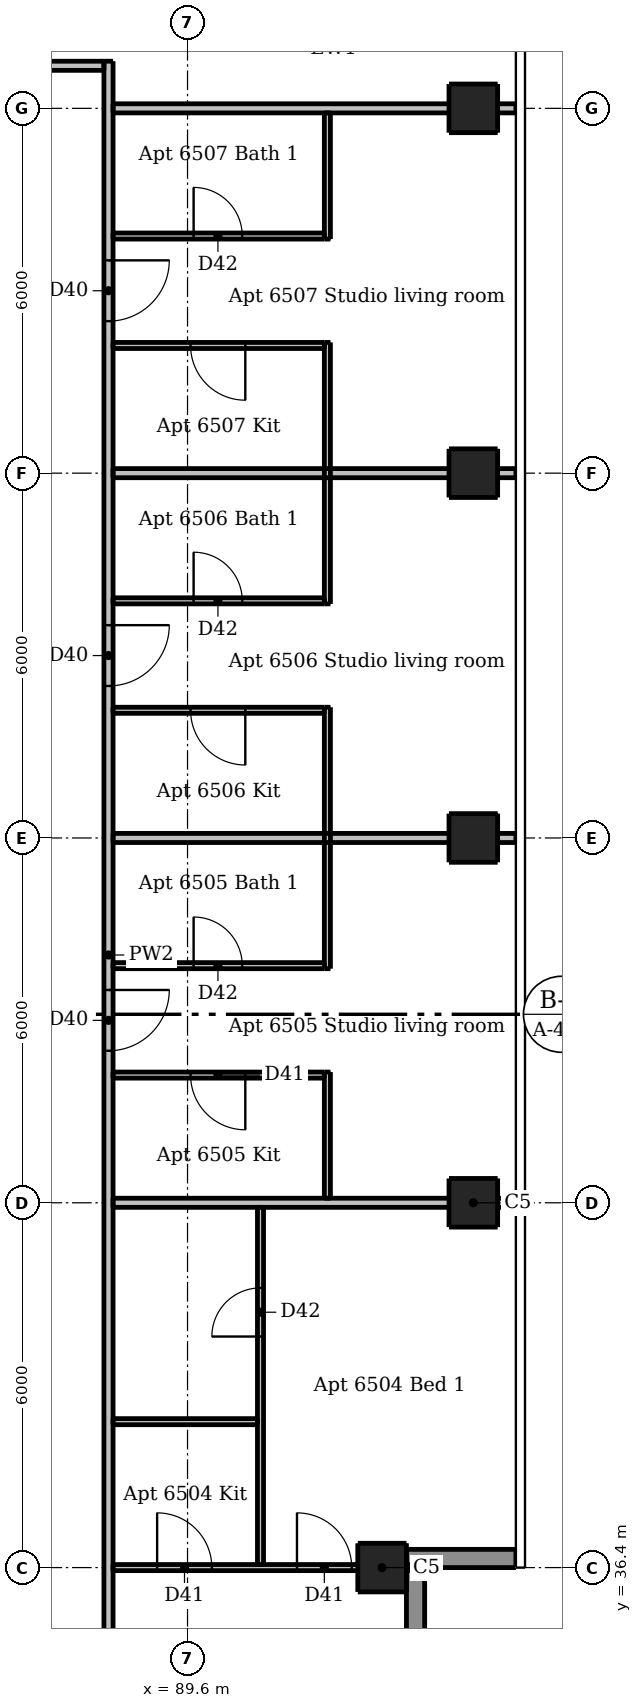
"""IFC4 building model, lengths in metres.
Left out: names, types, materials, properties, quantities, classifications, styles, units other than length and angle.
Written with IfcOpenShell. Run it as: python <this file> out.ifc"""

import sys

from ifc_helpers import new_model, si_unit, direction, frame, frame_2d, origin, origin_2d, place, context, subcontext, project, spatial, rectangle, extrude, element, fill, save


model = new_model("IFC4")
c1 = context("Model", 3, precision=1e-05, world=origin(), true_north=direction((0.0, 1.0)))
c2 = subcontext(c1, "Body", "Model", "MODEL_VIEW")
j1 = project(units=[si_unit("LENGTHUNIT", "METRE"), si_unit("PLANEANGLEUNIT", "RADIAN")], contexts=[c1])
p1 = place(None, origin())
s1 = spatial("IfcSite", under=j1, at=p1, CompositionType="ELEMENT")
p2 = place(p1, origin())
s2 = spatial("IfcBuilding", under=s1, at=p2, CompositionType="ELEMENT")
p3 = place(p2, frame((0.0, 0.0, 245.5)))
s3 = spatial("IfcBuildingStorey", under=s2, at=p3, CompositionType="ELEMENT", Elevation=245.5)
for number, where, z_axis, x_axis in (
    (1, (92.8, 36.4, 0.0), (0.0, 0.0, 1.0), (1.0, 0.0, 0.0)),
    (2, (94.3, 42.4, 0.0), (0.0, 0.0, 1.0), (1.0, 0.0, 0.0)),
    (3, (94.3, 48.4, 0.0), (0.0, 0.0, 1.0), (1.0, 0.0, 0.0)),
    (4, (94.3, 54.4, 0.0), (0.0, 0.0, 1.0), (1.0, 0.0, 0.0)),
    (5, (94.3, 60.4, 0.0), (0.0, 0.0, 1.0), (1.0, 0.0, 0.0)),
):
    element("IfcColumn", number, at=place(p3, frame(where, z_axis=z_axis, x_axis=x_axis)), inside=s3, PredefinedType="COLUMN", context=c2, shape_type="SweptSolid", body=[
        extrude(rectangle(XDim=0.8, YDim=0.8, at=origin_2d()), origin(), (0.0, 0.0, 1.0), 3.05),
    ])
p4 = place(p3, frame((93.2, 36.55, 0.0), z_axis=(0.0, 0.0, 1.0), x_axis=(1.0, 0.0, 0.0)))
e6 = element("IfcWall", 6, at=p4, inside=s3, PredefinedType="SOLIDWALL", context=c2, shape_type="SweptSolid", body=[
    extrude(rectangle(XDim=1.8, YDim=0.3, at=frame_2d((0.9, 0.0))), origin(), (0.0, 0.0, 1.0), 3.05),
])
p5 = place(p3, frame((93.35, 31.3, 0.0), z_axis=(0.0, 0.0, 1.0), x_axis=(0.0, 1.0, 0.0)))
e7 = element("IfcWall", 7, at=p5, inside=s3, PredefinedType="SOLIDWALL", context=c2, shape_type="SweptSolid", body=[
    extrude(rectangle(XDim=5.1, YDim=0.3, at=frame_2d((2.55, 0.0))), origin(), (0.0, 0.0, 1.0), 3.05),
])
p6 = place(p5, frame((1.2, 0.0, 0.15)))
e8 = element("IfcOpeningElement", 8, at=p6, cuts=e7, PredefinedType="OPENING", context=c2, shape_type="SweptSolid", body=[
    extrude(rectangle(XDim=2.7, YDim=2.1, at=frame_2d((1.35, 1.05))), frame((0.0, 0.16, 0.0), z_axis=(0.0, -1.0, 0.0), x_axis=(1.0, 0.0, 0.0)), (0.0, 0.0, 1.0), 0.32),
])
p7 = place(p3, frame((90.8, 36.45, 0.0), z_axis=(0.0, 0.0, 1.0), x_axis=(0.0, 1.0, 0.0)))
e9 = element("IfcWall", 9, at=p7, inside=s3, PredefinedType="PARTITIONING", context=c2, shape_type="SweptSolid", body=[
    extrude(rectangle(XDim=5.875, YDim=0.1, at=frame_2d((2.938, 0.0))), origin(), (0.0, 0.0, 1.0), 3.05),
])
p8 = place(p7, frame((3.75, 0.0, 0.0)))
e10 = element("IfcOpeningElement", 10, at=p8, cuts=e9, PredefinedType="OPENING", context=c2, shape_type="SweptSolid", body=[
    extrude(rectangle(XDim=0.8, YDim=2.1, at=frame_2d((0.4, 1.05))), frame((0.0, 0.06, 0.0), z_axis=(0.0, -1.0, 0.0), x_axis=(1.0, 0.0, 0.0)), (0.0, 0.0, 1.0), 0.12),
])
p9 = place(p3, frame((91.9, 42.475, 0.0), z_axis=(0.0, 0.0, 1.0), x_axis=(0.0, 1.0, 0.0)))
e11 = element("IfcWall", 11, at=p9, inside=s3, PredefinedType="PARTITIONING", context=c2, shape_type="SweptSolid", body=[
    extrude(rectangle(XDim=2.075, YDim=0.1, at=frame_2d((1.038, 0.0))), origin(), (0.0, 0.0, 1.0), 3.05),
])
for number, where, z_axis, x_axis in (
    (12, (91.9, 46.25, 0.0), (0.0, 0.0, 1.0), (0.0, 1.0, 0.0)),
    (13, (91.9, 52.25, 0.0), (0.0, 0.0, 1.0), (0.0, 1.0, 0.0)),
):
    element("IfcWall", number, at=place(p3, frame(where, z_axis=z_axis, x_axis=x_axis)), inside=s3, PredefinedType="PARTITIONING", context=c2, shape_type="SweptSolid", body=[
        extrude(rectangle(XDim=4.3, YDim=0.1, at=frame_2d((2.15, 0.0))), origin(), (0.0, 0.0, 1.0), 3.05),
    ])
p10 = place(p3, frame((91.9, 58.25, 0.0), z_axis=(0.0, 0.0, 1.0), x_axis=(0.0, 1.0, 0.0)))
e14 = element("IfcWall", 14, at=p10, inside=s3, PredefinedType="PARTITIONING", context=c2, shape_type="SweptSolid", body=[
    extrude(rectangle(XDim=2.075, YDim=0.1, at=frame_2d((1.038, 0.0))), origin(), (0.0, 0.0, 1.0), 3.05),
])
p11 = place(p3, frame((88.375, 58.3, 0.0), z_axis=(0.0, 0.0, 1.0), x_axis=(1.0, 0.0, 0.0)))
e15 = element("IfcWall", 15, at=p11, inside=s3, PredefinedType="PARTITIONING", context=c2, shape_type="SweptSolid", body=[
    extrude(rectangle(XDim=3.475, YDim=0.1, at=frame_2d((1.738, 0.0))), origin(), (0.0, 0.0, 1.0), 3.05),
])
p12 = place(p11, frame((1.325, 0.0, 0.0)))
e16 = element("IfcOpeningElement", 16, at=p12, cuts=e15, PredefinedType="OPENING", context=c2, shape_type="SweptSolid", body=[
    extrude(rectangle(XDim=0.8, YDim=2.1, at=frame_2d((0.4, 1.05))), frame((0.0, 0.06, 0.0), z_axis=(0.0, -1.0, 0.0), x_axis=(1.0, 0.0, 0.0)), (0.0, 0.0, 1.0), 0.12),
])
p13 = place(p3, frame((91.85, 56.5, 0.0), z_axis=(0.0, 0.0, 1.0), x_axis=(-1.0, 0.0, 0.0)))
e17 = element("IfcWall", 17, at=p13, inside=s3, PredefinedType="PARTITIONING", context=c2, shape_type="SweptSolid", body=[
    extrude(rectangle(XDim=3.475, YDim=0.1, at=frame_2d((1.738, 0.0))), origin(), (0.0, 0.0, 1.0), 3.05),
])
p14 = place(p13, frame((1.3, 0.0, 0.0)))
e18 = element("IfcOpeningElement", 18, at=p14, cuts=e17, PredefinedType="OPENING", context=c2, shape_type="SweptSolid", body=[
    extrude(rectangle(XDim=0.9, YDim=2.1, at=frame_2d((0.45, 1.05))), frame((0.0, 0.06, 0.0), z_axis=(0.0, -1.0, 0.0), x_axis=(1.0, 0.0, 0.0)), (0.0, 0.0, 1.0), 0.12),
])
p15 = place(p3, frame((88.375, 52.3, 0.0), z_axis=(0.0, 0.0, 1.0), x_axis=(1.0, 0.0, 0.0)))
e19 = element("IfcWall", 19, at=p15, inside=s3, PredefinedType="PARTITIONING", context=c2, shape_type="SweptSolid", body=[
    extrude(rectangle(XDim=3.475, YDim=0.1, at=frame_2d((1.738, 0.0))), origin(), (0.0, 0.0, 1.0), 3.05),
])
p16 = place(p15, frame((1.325, 0.0, 0.0)))
e20 = element("IfcOpeningElement", 20, at=p16, cuts=e19, PredefinedType="OPENING", context=c2, shape_type="SweptSolid", body=[
    extrude(rectangle(XDim=0.8, YDim=2.1, at=frame_2d((0.4, 1.05))), frame((0.0, 0.06, 0.0), z_axis=(0.0, -1.0, 0.0), x_axis=(1.0, 0.0, 0.0)), (0.0, 0.0, 1.0), 0.12),
])
p17 = place(p3, frame((91.85, 50.5, 0.0), z_axis=(0.0, 0.0, 1.0), x_axis=(-1.0, 0.0, 0.0)))
e21 = element("IfcWall", 21, at=p17, inside=s3, PredefinedType="PARTITIONING", context=c2, shape_type="SweptSolid", body=[
    extrude(rectangle(XDim=3.475, YDim=0.1, at=frame_2d((1.738, 0.0))), origin(), (0.0, 0.0, 1.0), 3.05),
])
p18 = place(p17, frame((1.3, 0.0, 0.0)))
e22 = element("IfcOpeningElement", 22, at=p18, cuts=e21, PredefinedType="OPENING", context=c2, shape_type="SweptSolid", body=[
    extrude(rectangle(XDim=0.9, YDim=2.1, at=frame_2d((0.45, 1.05))), frame((0.0, 0.06, 0.0), z_axis=(0.0, -1.0, 0.0), x_axis=(1.0, 0.0, 0.0)), (0.0, 0.0, 1.0), 0.12),
])
p19 = place(p3, frame((88.375, 46.3, 0.0), z_axis=(0.0, 0.0, 1.0), x_axis=(1.0, 0.0, 0.0)))
e23 = element("IfcWall", 23, at=p19, inside=s3, PredefinedType="PARTITIONING", context=c2, shape_type="SweptSolid", body=[
    extrude(rectangle(XDim=3.475, YDim=0.1, at=frame_2d((1.738, 0.0))), origin(), (0.0, 0.0, 1.0), 3.05),
])
p20 = place(p19, frame((1.325, 0.0, 0.0)))
e24 = element("IfcOpeningElement", 24, at=p20, cuts=e23, PredefinedType="OPENING", context=c2, shape_type="SweptSolid", body=[
    extrude(rectangle(XDim=0.8, YDim=2.1, at=frame_2d((0.4, 1.05))), frame((0.0, 0.06, 0.0), z_axis=(0.0, -1.0, 0.0), x_axis=(1.0, 0.0, 0.0)), (0.0, 0.0, 1.0), 0.12),
])
p21 = place(p3, frame((91.85, 44.5, 0.0), z_axis=(0.0, 0.0, 1.0), x_axis=(-1.0, 0.0, 0.0)))
e25 = element("IfcWall", 25, at=p21, inside=s3, PredefinedType="PARTITIONING", context=c2, shape_type="SweptSolid", body=[
    extrude(rectangle(XDim=3.475, YDim=0.1, at=frame_2d((1.738, 0.0))), origin(), (0.0, 0.0, 1.0), 3.05),
])
p22 = place(p21, frame((1.3, 0.0, 0.0)))
e26 = element("IfcOpeningElement", 26, at=p22, cuts=e25, PredefinedType="OPENING", context=c2, shape_type="SweptSolid", body=[
    extrude(rectangle(XDim=0.9, YDim=2.1, at=frame_2d((0.45, 1.05))), frame((0.0, 0.06, 0.0), z_axis=(0.0, -1.0, 0.0), x_axis=(1.0, 0.0, 0.0)), (0.0, 0.0, 1.0), 0.12),
])
p23 = place(p3, frame((88.375, 38.8, 0.0), z_axis=(0.0, 0.0, 1.0), x_axis=(1.0, 0.0, 0.0)))
e27 = element("IfcWall", 27, at=p23, inside=s3, PredefinedType="PARTITIONING", context=c2, shape_type="SweptSolid", body=[
    extrude(rectangle(XDim=2.375, YDim=0.1, at=frame_2d((1.188, 0.0))), origin(), (0.0, 0.0, 1.0), 3.05),
])
p24 = place(p3, frame((88.375, 36.4, 0.0), z_axis=(0.0, 0.0, 1.0), x_axis=(1.0, 0.0, 0.0)))
e28 = element("IfcWall", 28, at=p24, inside=s3, PredefinedType="PARTITIONING", context=c2, shape_type="SweptSolid", body=[
    extrude(rectangle(XDim=5.125, YDim=0.1, at=frame_2d((2.562, 0.0))), origin(), (0.0, 0.0, 1.0), 2.647),
])
p25 = place(p24, frame((0.725, 0.0, 0.0)))
e29 = element("IfcOpeningElement", 29, at=p25, cuts=e28, PredefinedType="OPENING", context=c2, shape_type="SweptSolid", body=[
    extrude(rectangle(XDim=0.9, YDim=2.1, at=frame_2d((0.45, 1.05))), frame((0.0, 0.06, 0.0), z_axis=(0.0, -1.0, 0.0), x_axis=(1.0, 0.0, 0.0)), (0.0, 0.0, 1.0), 0.12),
])
p26 = place(p24, frame((3.025, 0.0, 0.0)))
e30 = element("IfcOpeningElement", 30, at=p26, cuts=e28, PredefinedType="OPENING", context=c2, shape_type="SweptSolid", body=[
    extrude(rectangle(XDim=0.9, YDim=2.1, at=frame_2d((0.45, 1.05))), frame((0.0, 0.06, 0.0), z_axis=(0.0, -1.0, 0.0), x_axis=(1.0, 0.0, 0.0)), (0.0, 0.0, 1.0), 0.12),
])
p27 = place(p3, frame((88.3, 61.175, 0.0), z_axis=(0.0, 0.0, 1.0), x_axis=(0.0, -1.0, 0.0)))
e31 = element("IfcWall", 31, at=p27, inside=s3, PredefinedType="PARTITIONING", context=c2, shape_type="SweptSolid", body=[
    extrude(rectangle(XDim=29.4, YDim=0.15, at=frame_2d((14.7, 0.0))), origin(), (0.0, 0.0, 1.0), 3.05),
])
p28 = place(p27, frame((26.625, 0.0, 0.0)))
e32 = element("IfcOpeningElement", 32, at=p28, cuts=e31, PredefinedType="OPENING", context=c2, shape_type="SweptSolid", body=[
    extrude(rectangle(XDim=1.0, YDim=2.1, at=frame_2d((0.5, 1.05))), frame((0.0, 0.085, 0.0), z_axis=(0.0, -1.0, 0.0), x_axis=(1.0, 0.0, 0.0)), (0.0, 0.0, 1.0), 0.17),
])
p29 = place(p27, frame((15.275, 0.0, 0.0)))
e33 = element("IfcOpeningElement", 33, at=p29, cuts=e31, PredefinedType="OPENING", context=c2, shape_type="SweptSolid", body=[
    extrude(rectangle(XDim=1.0, YDim=2.1, at=frame_2d((0.5, 1.05))), frame((0.0, 0.085, 0.0), z_axis=(0.0, -1.0, 0.0), x_axis=(1.0, 0.0, 0.0)), (0.0, 0.0, 1.0), 0.17),
])
p30 = place(p27, frame((9.275, 0.0, 0.0)))
e34 = element("IfcOpeningElement", 34, at=p30, cuts=e31, PredefinedType="OPENING", context=c2, shape_type="SweptSolid", body=[
    extrude(rectangle(XDim=1.0, YDim=2.1, at=frame_2d((0.5, 1.05))), frame((0.0, 0.085, 0.0), z_axis=(0.0, -1.0, 0.0), x_axis=(1.0, 0.0, 0.0)), (0.0, 0.0, 1.0), 0.17),
])
p31 = place(p27, frame((3.275, 0.0, 0.0)))
e35 = element("IfcOpeningElement", 35, at=p31, cuts=e31, PredefinedType="OPENING", context=c2, shape_type="SweptSolid", body=[
    extrude(rectangle(XDim=1.0, YDim=2.1, at=frame_2d((0.5, 1.05))), frame((0.0, 0.085, 0.0), z_axis=(0.0, -1.0, 0.0), x_axis=(1.0, 0.0, 0.0)), (0.0, 0.0, 1.0), 0.17),
])
p32 = place(p3, frame((58.975, 61.1, 0.0), z_axis=(0.0, 0.0, 1.0), x_axis=(1.0, 0.0, 0.0)))
e36 = element("IfcWall", 36, at=p32, inside=s3, PredefinedType="PARTITIONING", context=c2, shape_type="SweptSolid", body=[
    extrude(rectangle(XDim=29.25, YDim=0.15, at=frame_2d((14.625, 0.0))), origin(), (0.0, 0.0, 1.0), 3.05),
])
p33 = place(p32, frame((3.125, 0.0, 0.0)))
e37 = element("IfcOpeningElement", 37, at=p33, cuts=e36, PredefinedType="OPENING", context=c2, shape_type="SweptSolid", body=[
    extrude(rectangle(XDim=1.0, YDim=2.1, at=frame_2d((0.5, 1.05))), frame((0.0, 0.085, 0.0), z_axis=(0.0, -1.0, 0.0), x_axis=(1.0, 0.0, 0.0)), (0.0, 0.0, 1.0), 0.17),
])
p34 = place(p32, frame((13.925, 0.0, 0.0)))
e38 = element("IfcOpeningElement", 38, at=p34, cuts=e36, PredefinedType="OPENING", context=c2, shape_type="SweptSolid", body=[
    extrude(rectangle(XDim=1.0, YDim=2.1, at=frame_2d((0.5, 1.05))), frame((0.0, 0.085, 0.0), z_axis=(0.0, -1.0, 0.0), x_axis=(1.0, 0.0, 0.0)), (0.0, 0.0, 1.0), 0.17),
])
p35 = place(p32, frame((26.475, 0.0, 0.0)))
e39 = element("IfcOpeningElement", 39, at=p35, cuts=e36, PredefinedType="OPENING", context=c2, shape_type="SweptSolid", body=[
    extrude(rectangle(XDim=1.0, YDim=2.1, at=frame_2d((0.5, 1.05))), frame((0.0, 0.085, 0.0), z_axis=(0.0, -1.0, 0.0), x_axis=(1.0, 0.0, 0.0)), (0.0, 0.0, 1.0), 0.17),
])
p36 = place(p3, frame((88.375, 60.4, 0.0), z_axis=(0.0, 0.0, 1.0), x_axis=(1.0, 0.0, 0.0)))
e40 = element("IfcWall", 40, at=p36, inside=s3, PredefinedType="PARTITIONING", context=c2, shape_type="SweptSolid", body=[
    extrude(rectangle(XDim=6.625, YDim=0.15, at=frame_2d((3.312, 0.0))), origin(), (0.0, 0.0, 1.0), 2.647),
])
for number, where, z_axis, x_axis in (
    (41, (88.375, 54.4, 0.0), (0.0, 0.0, 1.0), (1.0, 0.0, 0.0)),
    (42, (88.375, 48.4, 0.0), (0.0, 0.0, 1.0), (1.0, 0.0, 0.0)),
    (43, (88.375, 42.4, 0.0), (0.0, 0.0, 1.0), (1.0, 0.0, 0.0)),
):
    element("IfcWall", number, at=place(p3, frame(where, z_axis=z_axis, x_axis=x_axis)), inside=s3, PredefinedType="PARTITIONING", context=c2, shape_type="SweptSolid", body=[
        extrude(rectangle(XDim=6.625, YDim=0.15, at=frame_2d((3.312, 0.0))), origin(), (0.0, 0.0, 1.0), 2.59),
    ])
p37 = place(p25, origin())
e44 = element("IfcDoor", 44, at=p37, inside=s3, OperationType="SINGLE_SWING_LEFT", PredefinedType="DOOR", context=c2, shape_type="SweptSolid", body=[
    extrude(rectangle(XDim=0.9, YDim=2.1, at=frame_2d((0.45, 1.05))), frame((0.0, 0.025, 0.0), z_axis=(0.0, -1.0, 0.0), x_axis=(1.0, 0.0, 0.0)), (0.0, 0.0, 1.0), 0.05),
])
fill(e29, e44)
p38 = place(p26, origin())
e45 = element("IfcDoor", 45, at=p38, inside=s3, OperationType="SINGLE_SWING_LEFT", PredefinedType="DOOR", context=c2, shape_type="SweptSolid", body=[
    extrude(rectangle(XDim=0.9, YDim=2.1, at=frame_2d((0.45, 1.05))), frame((0.0, 0.025, 0.0), z_axis=(0.0, -1.0, 0.0), x_axis=(1.0, 0.0, 0.0)), (0.0, 0.0, 1.0), 0.05),
])
fill(e30, e45)
p39 = place(p8, origin())
e46 = element("IfcDoor", 46, at=p39, inside=s3, OperationType="SINGLE_SWING_LEFT", PredefinedType="DOOR", context=c2, shape_type="SweptSolid", body=[
    extrude(rectangle(XDim=0.8, YDim=2.1, at=frame_2d((0.4, 1.05))), frame((0.0, 0.025, 0.0), z_axis=(0.0, -1.0, 0.0), x_axis=(1.0, 0.0, 0.0)), (0.0, 0.0, 1.0), 0.05),
])
fill(e10, e46)
p40 = place(p29, origin())
e47 = element("IfcDoor", 47, at=p40, inside=s3, OperationType="SINGLE_SWING_LEFT", PredefinedType="DOOR", context=c2, shape_type="SweptSolid", body=[
    extrude(rectangle(XDim=1.0, YDim=2.1, at=frame_2d((0.5, 1.05))), frame((0.0, 0.025, 0.0), z_axis=(0.0, -1.0, 0.0), x_axis=(1.0, 0.0, 0.0)), (0.0, 0.0, 1.0), 0.05),
])
fill(e33, e47)
p41 = place(p22, origin())
e48 = element("IfcDoor", 48, at=p41, inside=s3, OperationType="SINGLE_SWING_LEFT", PredefinedType="DOOR", context=c2, shape_type="SweptSolid", body=[
    extrude(rectangle(XDim=0.9, YDim=2.1, at=frame_2d((0.45, 1.05))), frame((0.0, 0.025, 0.0), z_axis=(0.0, -1.0, 0.0), x_axis=(1.0, 0.0, 0.0)), (0.0, 0.0, 1.0), 0.05),
])
fill(e26, e48)
p42 = place(p20, origin())
e49 = element("IfcDoor", 49, at=p42, inside=s3, OperationType="SINGLE_SWING_LEFT", PredefinedType="DOOR", context=c2, shape_type="SweptSolid", body=[
    extrude(rectangle(XDim=0.8, YDim=2.1, at=frame_2d((0.4, 1.05))), frame((0.0, 0.025, 0.0), z_axis=(0.0, -1.0, 0.0), x_axis=(1.0, 0.0, 0.0)), (0.0, 0.0, 1.0), 0.05),
])
fill(e24, e49)
p43 = place(p30, origin())
e50 = element("IfcDoor", 50, at=p43, inside=s3, OperationType="SINGLE_SWING_LEFT", PredefinedType="DOOR", context=c2, shape_type="SweptSolid", body=[
    extrude(rectangle(XDim=1.0, YDim=2.1, at=frame_2d((0.5, 1.05))), frame((0.0, 0.025, 0.0), z_axis=(0.0, -1.0, 0.0), x_axis=(1.0, 0.0, 0.0)), (0.0, 0.0, 1.0), 0.05),
])
fill(e34, e50)
p44 = place(p18, origin())
e51 = element("IfcDoor", 51, at=p44, inside=s3, OperationType="SINGLE_SWING_LEFT", PredefinedType="DOOR", context=c2, shape_type="SweptSolid", body=[
    extrude(rectangle(XDim=0.9, YDim=2.1, at=frame_2d((0.45, 1.05))), frame((0.0, 0.025, 0.0), z_axis=(0.0, -1.0, 0.0), x_axis=(1.0, 0.0, 0.0)), (0.0, 0.0, 1.0), 0.05),
])
fill(e22, e51)
p45 = place(p16, origin())
e52 = element("IfcDoor", 52, at=p45, inside=s3, OperationType="SINGLE_SWING_LEFT", PredefinedType="DOOR", context=c2, shape_type="SweptSolid", body=[
    extrude(rectangle(XDim=0.8, YDim=2.1, at=frame_2d((0.4, 1.05))), frame((0.0, 0.025, 0.0), z_axis=(0.0, -1.0, 0.0), x_axis=(1.0, 0.0, 0.0)), (0.0, 0.0, 1.0), 0.05),
])
fill(e20, e52)
p46 = place(p31, origin())
e53 = element("IfcDoor", 53, at=p46, inside=s3, OperationType="SINGLE_SWING_LEFT", PredefinedType="DOOR", context=c2, shape_type="SweptSolid", body=[
    extrude(rectangle(XDim=1.0, YDim=2.1, at=frame_2d((0.5, 1.05))), frame((0.0, 0.025, 0.0), z_axis=(0.0, -1.0, 0.0), x_axis=(1.0, 0.0, 0.0)), (0.0, 0.0, 1.0), 0.05),
])
fill(e35, e53)
p47 = place(p14, origin())
e54 = element("IfcDoor", 54, at=p47, inside=s3, OperationType="SINGLE_SWING_LEFT", PredefinedType="DOOR", context=c2, shape_type="SweptSolid", body=[
    extrude(rectangle(XDim=0.9, YDim=2.1, at=frame_2d((0.45, 1.05))), frame((0.0, 0.025, 0.0), z_axis=(0.0, -1.0, 0.0), x_axis=(1.0, 0.0, 0.0)), (0.0, 0.0, 1.0), 0.05),
])
fill(e18, e54)
p48 = place(p12, origin())
e55 = element("IfcDoor", 55, at=p48, inside=s3, OperationType="SINGLE_SWING_LEFT", PredefinedType="DOOR", context=c2, shape_type="SweptSolid", body=[
    extrude(rectangle(XDim=0.8, YDim=2.1, at=frame_2d((0.4, 1.05))), frame((0.0, 0.025, 0.0), z_axis=(0.0, -1.0, 0.0), x_axis=(1.0, 0.0, 0.0)), (0.0, 0.0, 1.0), 0.05),
])
fill(e16, e55)
save(model, sys.argv[1])
